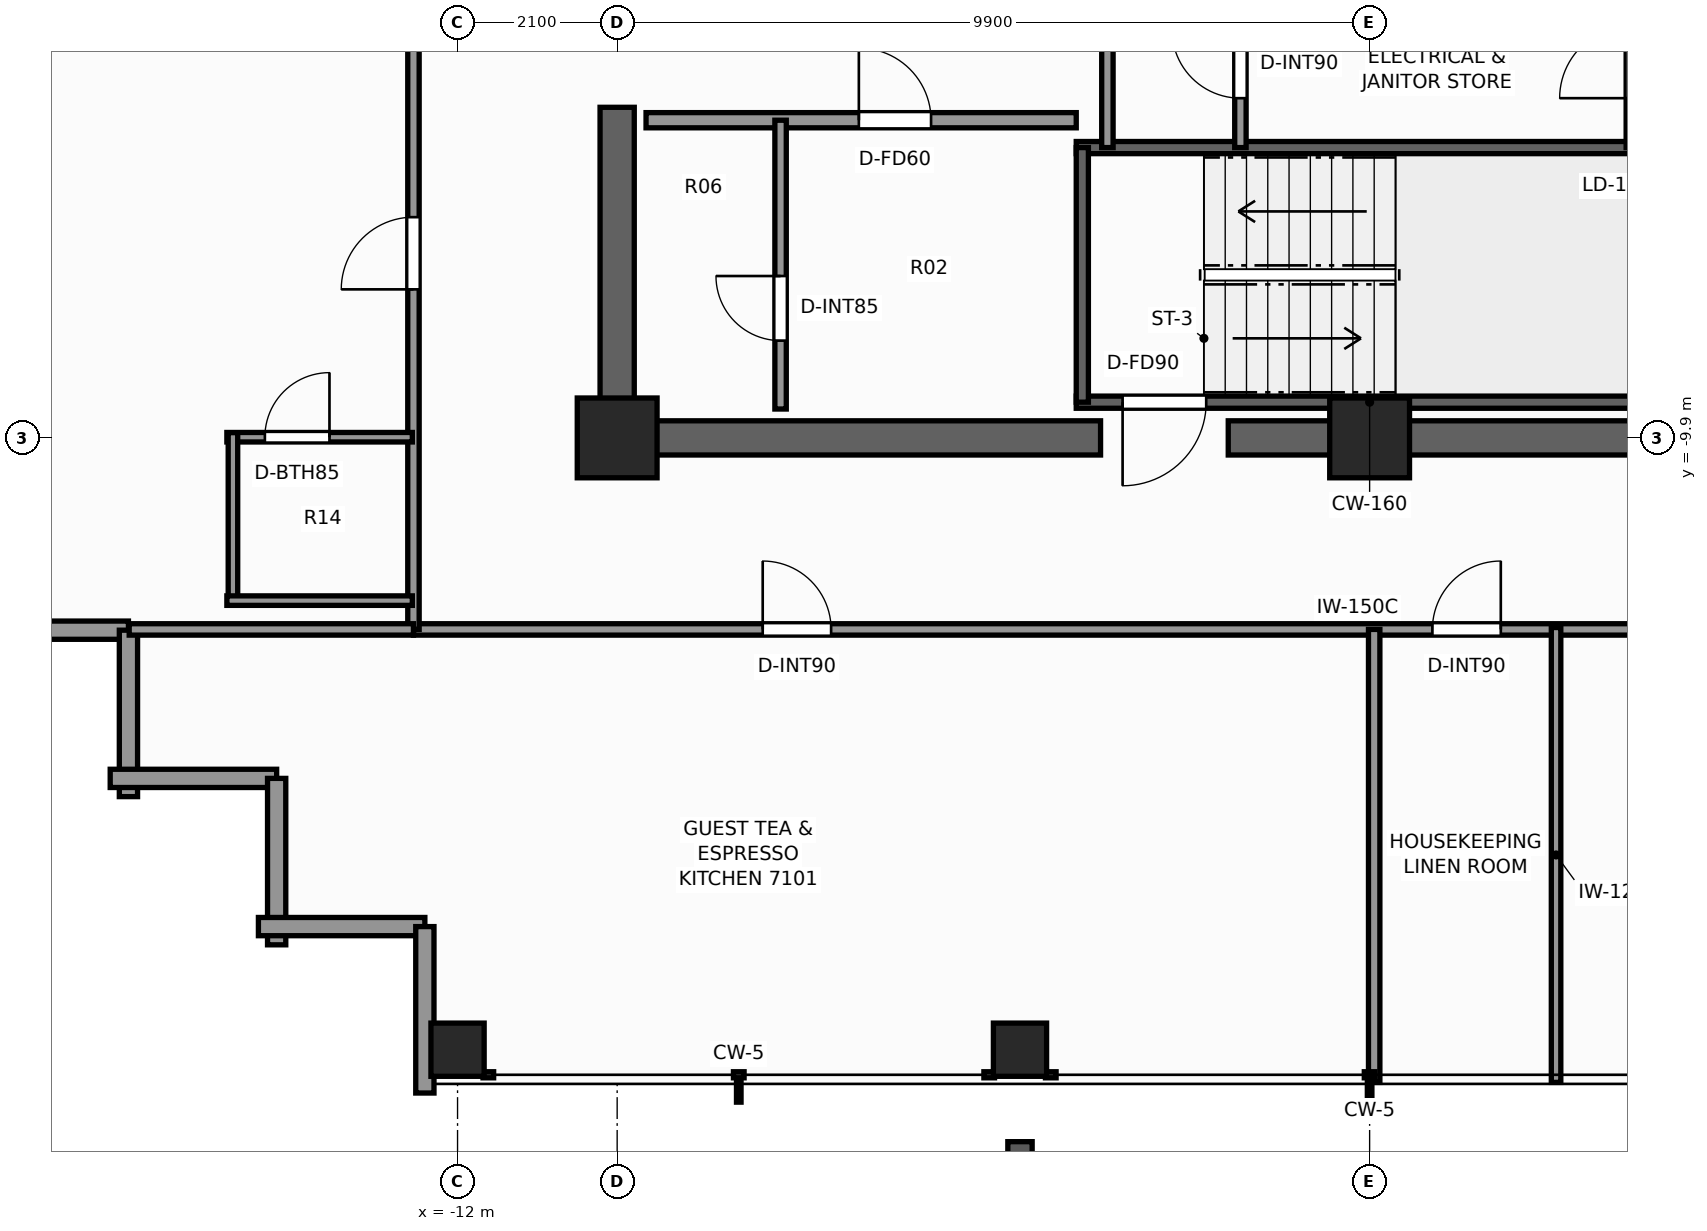
"""IFC4 building model, lengths in metres.
Left out: names, types, materials, properties, quantities, classifications, styles, units other than length and angle.
Written with IfcOpenShell. Run it as: python <this file> out.ifc"""

import sys

from ifc_helpers import new_model, si_unit, direction, frame, frame_2d, origin, origin_2d, place, context, subcontext, project, spatial, rectangle, extrude, element, fill, save


model = new_model("IFC4")
c1 = context("Model", 3, precision=1e-05, world=origin(), true_north=direction((0.0, 1.0)))
c2 = subcontext(c1, "Body", "Model", "MODEL_VIEW")
j1 = project(units=[si_unit("LENGTHUNIT", "METRE"), si_unit("PLANEANGLEUNIT", "RADIAN")], contexts=[c1])
p1 = place(None, origin())
s1 = spatial("IfcSite", under=j1, at=p1, CompositionType="ELEMENT")
p2 = place(p1, origin())
s2 = spatial("IfcBuilding", under=s1, at=p2, CompositionType="ELEMENT")
p3 = place(p2, frame((0.0, 0.0, 244.4)))
s3 = spatial("IfcBuildingStorey", under=s2, at=p3, CompositionType="ELEMENT", Elevation=244.4)
p4 = place(p3, frame((10.125, -9.9, 0.0), z_axis=(0.0, 0.0, 1.0), x_axis=(-1.0, 0.0, 0.0)))
e1 = element("IfcWall", 1, at=p4, inside=s3, PredefinedType="SHEAR", context=c2, shape_type="SweptSolid", body=[
    extrude(rectangle(XDim=11.985, YDim=0.45, at=frame_2d((5.993, 0.0))), origin(), (0.0, 0.0, 1.0), 3.5),
])
p5 = place(p3, frame((-3.54, -9.9, 0.0), z_axis=(0.0, 0.0, 1.0), x_axis=(-1.0, 0.0, 0.0)))
e2 = element("IfcWall", 2, at=p5, inside=s3, PredefinedType="SHEAR", context=c2, shape_type="SweptSolid", body=[
    extrude(rectangle(XDim=6.585, YDim=0.45, at=frame_2d((3.292, 0.0))), origin(), (0.0, 0.0, 1.0), 3.5),
])
p6 = place(p3, frame((-9.9, -9.675, 0.0), z_axis=(0.0, 0.0, 1.0), x_axis=(0.0, 1.0, 0.0)))
e3 = element("IfcWall", 3, at=p6, inside=s3, PredefinedType="SHEAR", context=c2, shape_type="SweptSolid", body=[
    extrude(rectangle(XDim=4.125, YDim=0.45, at=frame_2d((2.062, 0.0))), origin(), (0.0, 0.0, 1.0), 3.5),
])
for number, where, z_axis, x_axis in (
    (4, (-9.9, -9.9, 0.0), (0.0, 0.0, 1.0), (1.0, 0.0, 0.0)),
    (5, (0.0, -9.9, 0.0), (0.0, 0.0, 1.0), (1.0, 0.0, 0.0)),
):
    element("IfcColumn", number, at=place(p3, frame(where, z_axis=z_axis, x_axis=x_axis)), inside=s3, PredefinedType="COLUMN", context=c2, shape_type="SweptSolid", body=[
        extrude(rectangle(XDim=1.05, YDim=1.05, at=origin_2d()), origin(), (0.0, 0.0, 1.0), 3.5),
    ])
for number, where, z_axis, x_axis in (
    (6, (-12.0, -17.95, 0.0), (0.0, 0.0, 1.0), (1.0, 0.0, 0.0)),
    (7, (-4.6, -17.95, 0.0), (0.0, 0.0, 1.0), (1.0, 0.0, 0.0)),
):
    element("IfcColumn", number, at=place(p3, frame(where, z_axis=z_axis, x_axis=x_axis)), inside=s3, PredefinedType="COLUMN", context=c2, shape_type="SweptSolid", body=[
        extrude(rectangle(XDim=0.7, YDim=0.7, at=origin_2d()), origin(), (0.0, 0.0, 1.0), 3.5),
    ])
p7 = place(p3, frame((-16.33, -12.43, 0.0), z_axis=(0.0, 0.0, 1.0), x_axis=(-1.0, 0.0, 0.0)))
e8 = element("IfcWall", 8, at=p7, inside=s3, PredefinedType="STANDARD", context=c2, shape_type="SweptSolid", body=[
    extrude(rectangle(XDim=2.19, YDim=0.24, at=frame_2d((1.095, 0.0))), origin(), (0.0, 0.0, 1.0), 2.633),
])
for number, where, z_axis, x_axis in (
    (9, (-16.33, -14.62, 0.0), (0.0, 0.0, 1.0), (0.0, 1.0, 0.0)),
    (10, (-14.38, -14.38, 0.0), (0.0, 0.0, 1.0), (-1.0, 0.0, 0.0)),
    (11, (-14.38, -16.57, 0.0), (0.0, 0.0, 1.0), (0.0, 1.0, 0.0)),
    (12, (-12.43, -16.33, 0.0), (0.0, 0.0, 1.0), (-1.0, 0.0, 0.0)),
):
    element("IfcWall", number, at=place(p3, frame(where, z_axis=z_axis, x_axis=x_axis)), inside=s3, PredefinedType="STANDARD", context=c2, shape_type="SweptSolid", body=[
        extrude(rectangle(XDim=2.19, YDim=0.24, at=frame_2d((1.095, 0.0))), origin(), (0.0, 0.0, 1.0), 2.633),
    ])
p8 = place(p3, frame((-12.43, -18.52, 0.0), z_axis=(0.0, 0.0, 1.0), x_axis=(0.0, 1.0, 0.0)))
e13 = element("IfcWall", 13, at=p8, inside=s3, PredefinedType="STANDARD", context=c2, shape_type="SweptSolid", body=[
    extrude(rectangle(XDim=2.19, YDim=0.24, at=frame_2d((1.095, 0.0))), origin(), (0.0, 0.0, 1.0), 2.633),
])
p9 = place(p3, frame((3.86, -9.43, 0.0), z_axis=(0.0, 0.0, 1.0), x_axis=(-1.0, 0.0, 0.0)))
e14 = element("IfcWall", 14, at=p9, inside=s3, PredefinedType="SHEAR", context=c2, shape_type="SweptSolid", body=[
    extrude(rectangle(XDim=7.72, YDim=0.16, at=frame_2d((3.86, 0.0))), origin(), (0.0, 0.0, 1.0), 3.5),
])
p10 = place(p9, frame((6.01, 0.0, 0.0)))
e15 = element("IfcOpeningElement", 15, at=p10, cuts=e14, PredefinedType="OPENING", context=c2, shape_type="SweptSolid", body=[
    extrude(rectangle(XDim=1.1, YDim=2.2, at=frame_2d((0.55, 1.1))), frame((0.0, 0.09, 0.0), z_axis=(0.0, -1.0, 0.0), x_axis=(1.0, 0.0, 0.0)), (0.0, 0.0, 1.0), 0.18),
])
p11 = place(p3, frame((-3.86, -6.08, 0.0), z_axis=(0.0, 0.0, 1.0), x_axis=(1.0, 0.0, 0.0)))
e16 = element("IfcWall", 16, at=p11, inside=s3, PredefinedType="SHEAR", context=c2, shape_type="SweptSolid", body=[
    extrude(rectangle(XDim=7.72, YDim=0.16, at=frame_2d((3.86, 0.0))), origin(), (0.0, 0.0, 1.0), 3.5),
])
p12 = place(p3, frame((-3.78, -9.43, 0.0), z_axis=(0.0, 0.0, 1.0), x_axis=(0.0, 1.0, 0.0)))
e17 = element("IfcWall", 17, at=p12, inside=s3, PredefinedType="SHEAR", context=c2, shape_type="SweptSolid", body=[
    extrude(rectangle(XDim=3.35, YDim=0.16, at=frame_2d((1.675, 0.0))), origin(), (0.0, 0.0, 1.0), 3.5),
])
p13 = place(p3, frame((-9.52, -5.72, 0.0), z_axis=(0.0, 0.0, 1.0), x_axis=(1.0, 0.0, 0.0)))
e18 = element("IfcWall", 18, at=p13, inside=s3, PredefinedType="SOLIDWALL", context=c2, shape_type="SweptSolid", body=[
    extrude(rectangle(XDim=5.66, YDim=0.2, at=frame_2d((2.83, 0.0))), origin(), (0.0, 0.0, 1.0), 3.25),
])
p14 = place(p13, frame((2.8, 0.0, 0.0)))
e19 = element("IfcOpeningElement", 19, at=p14, cuts=e18, PredefinedType="OPENING", context=c2, shape_type="SweptSolid", body=[
    extrude(rectangle(XDim=0.95, YDim=2.06, at=frame_2d((0.475, 1.03))), frame((0.0, 0.11, 0.0), z_axis=(0.0, -1.0, 0.0), x_axis=(1.0, 0.0, 0.0)), (0.0, 0.0, 1.0), 0.22),
])
p15 = place(p3, frame((-7.75, -9.52, 0.0), z_axis=(0.0, 0.0, 1.0), x_axis=(0.0, 1.0, 0.0)))
e20 = element("IfcWall", 20, at=p15, inside=s3, PredefinedType="PARTITIONING", context=c2, shape_type="SweptSolid", body=[
    extrude(rectangle(XDim=3.8, YDim=0.15, at=frame_2d((1.9, 0.0))), origin(), (0.0, 0.0, 1.0), 3.25),
])
p16 = place(p15, frame((0.9, 0.0, 0.0)))
e21 = element("IfcOpeningElement", 21, at=p16, cuts=e20, PredefinedType="OPENING", context=c2, shape_type="SweptSolid", body=[
    extrude(rectangle(XDim=0.85, YDim=2.03, at=frame_2d((0.425, 1.015))), frame((0.0, 0.085, 0.0), z_axis=(0.0, -1.0, 0.0), x_axis=(1.0, 0.0, 0.0)), (0.0, 0.0, 1.0), 0.17),
])
p17 = place(p3, frame((3.45, -6.08, 0.0), z_axis=(0.0, 0.0, 1.0), x_axis=(0.0, 1.0, 0.0)))
e22 = element("IfcWall", 22, at=p17, inside=s3, PredefinedType="PARTITIONING", context=c2, shape_type="SweptSolid", body=[
    extrude(rectangle(XDim=2.36, YDim=0.15, at=frame_2d((1.18, 0.0))), origin(), (0.0, 0.0, 1.0), 3.25),
])
p18 = place(p17, frame((0.65, 0.0, 0.0)))
e23 = element("IfcOpeningElement", 23, at=p18, cuts=e22, PredefinedType="OPENING", context=c2, shape_type="SweptSolid", body=[
    extrude(rectangle(XDim=0.95, YDim=2.06, at=frame_2d((0.475, 1.03))), frame((0.0, 0.085, 0.0), z_axis=(0.0, -1.0, 0.0), x_axis=(1.0, 0.0, 0.0)), (0.0, 0.0, 1.0), 0.17),
])
p19 = place(p3, frame((-3.45, -6.08, 0.0), z_axis=(0.0, 0.0, 1.0), x_axis=(0.0, 1.0, 0.0)))
e24 = element("IfcWall", 24, at=p19, inside=s3, PredefinedType="PARTITIONING", context=c2, shape_type="SweptSolid", body=[
    extrude(rectangle(XDim=2.36, YDim=0.15, at=frame_2d((1.18, 0.0))), origin(), (0.0, 0.0, 1.0), 3.25),
])
p20 = place(p3, frame((-1.7, -6.08, 0.0), z_axis=(0.0, 0.0, 1.0), x_axis=(0.0, 1.0, 0.0)))
e25 = element("IfcWall", 25, at=p20, inside=s3, PredefinedType="PARTITIONING", context=c2, shape_type="SweptSolid", body=[
    extrude(rectangle(XDim=2.36, YDim=0.15, at=frame_2d((1.18, 0.0))), origin(), (0.0, 0.0, 1.0), 3.25),
])
p21 = place(p20, frame((0.65, 0.0, 0.0)))
e26 = element("IfcOpeningElement", 26, at=p21, cuts=e25, PredefinedType="OPENING", context=c2, shape_type="SweptSolid", body=[
    extrude(rectangle(XDim=0.9, YDim=2.06, at=frame_2d((0.45, 1.03))), frame((0.0, 0.085, 0.0), z_axis=(0.0, -1.0, 0.0), x_axis=(1.0, 0.0, 0.0)), (0.0, 0.0, 1.0), 0.17),
])
p22 = place(p3, frame((-12.58, -12.42, 0.0), z_axis=(0.0, 0.0, 1.0), x_axis=(1.0, 0.0, 0.0)))
e27 = element("IfcWall", 27, at=p22, inside=s3, PredefinedType="PARTITIONING", context=c2, shape_type="SweptSolid", body=[
    extrude(rectangle(XDim=24.84, YDim=0.15, at=frame_2d((12.42, 0.0))), origin(), (0.0, 0.0, 1.0), 2.539),
])
p23 = place(p22, frame((4.595, 0.0, 0.0)))
e28 = element("IfcOpeningElement", 28, at=p23, cuts=e27, PredefinedType="OPENING", context=c2, shape_type="SweptSolid", body=[
    extrude(rectangle(XDim=0.9, YDim=2.06, at=frame_2d((0.45, 1.03))), frame((0.0, 0.085, 0.0), z_axis=(0.0, -1.0, 0.0), x_axis=(1.0, 0.0, 0.0)), (0.0, 0.0, 1.0), 0.17),
])
p24 = place(p22, frame((13.406, 0.0, 0.0)))
e29 = element("IfcOpeningElement", 29, at=p24, cuts=e27, PredefinedType="OPENING", context=c2, shape_type="SweptSolid", body=[
    extrude(rectangle(XDim=0.9, YDim=2.06, at=frame_2d((0.45, 1.03))), frame((0.0, 0.085, 0.0), z_axis=(0.0, -1.0, 0.0), x_axis=(1.0, 0.0, 0.0)), (0.0, 0.0, 1.0), 0.17),
])
p25 = place(p22, frame((18.028, 0.0, 0.0)))
e30 = element("IfcOpeningElement", 30, at=p25, cuts=e27, PredefinedType="OPENING", context=c2, shape_type="SweptSolid", body=[
    extrude(rectangle(XDim=0.95, YDim=2.06, at=frame_2d((0.475, 1.03))), frame((0.0, 0.085, 0.0), z_axis=(0.0, -1.0, 0.0), x_axis=(1.0, 0.0, 0.0)), (0.0, 0.0, 1.0), 0.17),
])
p26 = place(p22, frame((20.478, 0.0, 0.0)))
e31 = element("IfcOpeningElement", 31, at=p26, cuts=e27, PredefinedType="OPENING", context=c2, shape_type="SweptSolid", body=[
    extrude(rectangle(XDim=0.9, YDim=2.06, at=frame_2d((0.45, 1.03))), frame((0.0, 0.085, 0.0), z_axis=(0.0, -1.0, 0.0), x_axis=(1.0, 0.0, 0.0)), (0.0, 0.0, 1.0), 0.17),
])
p27 = place(p3, frame((-12.58, -12.42, 0.0), z_axis=(0.0, 0.0, 1.0), x_axis=(0.0, 1.0, 0.0)))
e32 = element("IfcWall", 32, at=p27, inside=s3, PredefinedType="PARTITIONING", context=c2, shape_type="SweptSolid", body=[
    extrude(rectangle(XDim=24.84, YDim=0.15, at=frame_2d((12.42, 0.0))), origin(), (0.0, 0.0, 1.0), 2.539),
])
p28 = place(p27, frame((4.475, 0.0, 0.0)))
e33 = element("IfcOpeningElement", 33, at=p28, cuts=e32, PredefinedType="OPENING", context=c2, shape_type="SweptSolid", body=[
    extrude(rectangle(XDim=0.95, YDim=2.06, at=frame_2d((0.475, 1.03))), frame((0.0, 0.085, 0.0), z_axis=(0.0, -1.0, 0.0), x_axis=(1.0, 0.0, 0.0)), (0.0, 0.0, 1.0), 0.17),
])
p29 = place(p27, frame((19.48, 0.0, 0.0)))
e34 = element("IfcOpeningElement", 34, at=p29, cuts=e32, PredefinedType="OPENING", context=c2, shape_type="SweptSolid", body=[
    extrude(rectangle(XDim=0.95, YDim=2.06, at=frame_2d((0.475, 1.03))), frame((0.0, 0.085, 0.0), z_axis=(0.0, -1.0, 0.0), x_axis=(1.0, 0.0, 0.0)), (0.0, 0.0, 1.0), 0.17),
])
p30 = place(p3, frame((-16.32, -12.42, 0.0), z_axis=(0.0, 0.0, 1.0), x_axis=(1.0, 0.0, 0.0)))
e35 = element("IfcWall", 35, at=p30, inside=s3, PredefinedType="PARTITIONING", context=c2, shape_type="SweptSolid", body=[
    extrude(rectangle(XDim=3.74, YDim=0.15, at=frame_2d((1.87, 0.0))), origin(), (0.0, 0.0, 1.0), 3.25),
])
p31 = place(p3, frame((0.06, -18.38, 0.0), z_axis=(0.0, 0.0, 1.0), x_axis=(0.0, 1.0, 0.0)))
e36 = element("IfcWall", 36, at=p31, inside=s3, PredefinedType="PARTITIONING", context=c2, shape_type="SweptSolid", body=[
    extrude(rectangle(XDim=5.96, YDim=0.15, at=frame_2d((2.98, 0.0))), origin(), (0.0, 0.0, 1.0), 2.623),
])
p32 = place(p3, frame((2.453, -18.38, 0.0), z_axis=(0.0, 0.0, 1.0), x_axis=(0.0, 1.0, 0.0)))
e37 = element("IfcWall", 37, at=p32, inside=s3, PredefinedType="PARTITIONING", context=c2, shape_type="SweptSolid", body=[
    extrude(rectangle(XDim=5.985, YDim=0.125, at=frame_2d((2.992, 0.0))), origin(), (0.0, 0.0, 1.0), 2.623),
])
p33 = place(p3, frame((-15.035, -9.891, 0.0), z_axis=(0.0, 0.0, 1.0), x_axis=(1.0, 0.0, 0.0)))
e38 = element("IfcWall", 38, at=p33, inside=s3, PredefinedType="PARTITIONING", context=c2, shape_type="SweptSolid", body=[
    extrude(rectangle(XDim=2.44, YDim=0.125, at=frame_2d((1.22, 0.0))), origin(), (0.0, 0.0, 1.0), 3.25),
])
p34 = place(p33, frame((0.5, 0.0, 0.0)))
e39 = element("IfcOpeningElement", 39, at=p34, cuts=e38, PredefinedType="OPENING", context=c2, shape_type="SweptSolid", body=[
    extrude(rectangle(XDim=0.85, YDim=2.03, at=frame_2d((0.425, 1.015))), frame((0.0, 0.073, 0.0), z_axis=(0.0, -1.0, 0.0), x_axis=(1.0, 0.0, 0.0)), (0.0, 0.0, 1.0), 0.145),
])
p35 = place(p3, frame((-14.955, -12.101, 0.0), z_axis=(0.0, 0.0, 1.0), x_axis=(0.0, 1.0, 0.0)))
e40 = element("IfcWall", 40, at=p35, inside=s3, PredefinedType="PARTITIONING", context=c2, shape_type="SweptSolid", body=[
    extrude(rectangle(XDim=2.27, YDim=0.125, at=frame_2d((1.135, 0.0))), origin(), (0.0, 0.0, 1.0), 2.539),
])
p36 = place(p3, frame((-15.035, -12.041, 0.0), z_axis=(0.0, 0.0, 1.0), x_axis=(1.0, 0.0, 0.0)))
e41 = element("IfcWall", 41, at=p36, inside=s3, PredefinedType="PARTITIONING", context=c2, shape_type="SweptSolid", body=[
    extrude(rectangle(XDim=2.44, YDim=0.125, at=frame_2d((1.22, 0.0))), origin(), (0.0, 0.0, 1.0), 3.25),
])
p37 = place(p10, origin())
e42 = element("IfcDoor", 42, at=p37, inside=s3, OperationType="SINGLE_SWING_RIGHT", PredefinedType="DOOR", context=c2, shape_type="SweptSolid", body=[
    extrude(rectangle(XDim=1.1, YDim=2.2, at=frame_2d((0.55, 1.1))), frame((0.0, 0.025, 0.0), z_axis=(0.0, -1.0, 0.0), x_axis=(1.0, 0.0, 0.0)), (0.0, 0.0, 1.0), 0.05),
])
fill(e15, e42)
p38 = place(p14, origin())
e43 = element("IfcDoor", 43, at=p38, inside=s3, OperationType="SINGLE_SWING_LEFT", PredefinedType="DOOR", context=c2, shape_type="SweptSolid", body=[
    extrude(rectangle(XDim=0.95, YDim=2.06, at=frame_2d((0.475, 1.03))), frame((0.0, 0.025, 0.0), z_axis=(0.0, -1.0, 0.0), x_axis=(1.0, 0.0, 0.0)), (0.0, 0.0, 1.0), 0.05),
])
fill(e19, e43)
p39 = place(p16, origin())
e44 = element("IfcDoor", 44, at=p39, inside=s3, OperationType="SINGLE_SWING_RIGHT", PredefinedType="DOOR", context=c2, shape_type="SweptSolid", body=[
    extrude(rectangle(XDim=0.85, YDim=2.03, at=frame_2d((0.425, 1.015))), frame((0.0, 0.025, 0.0), z_axis=(0.0, -1.0, 0.0), x_axis=(1.0, 0.0, 0.0)), (0.0, 0.0, 1.0), 0.05),
])
fill(e21, e44)
p40 = place(p21, origin())
e45 = element("IfcDoor", 45, at=p40, inside=s3, OperationType="SINGLE_SWING_RIGHT", PredefinedType="DOOR", context=c2, shape_type="SweptSolid", body=[
    extrude(rectangle(XDim=0.9, YDim=2.06, at=frame_2d((0.45, 1.03))), frame((0.0, 0.025, 0.0), z_axis=(0.0, -1.0, 0.0), x_axis=(1.0, 0.0, 0.0)), (0.0, 0.0, 1.0), 0.05),
])
fill(e26, e45)
p41 = place(p23, origin())
e46 = element("IfcDoor", 46, at=p41, inside=s3, OperationType="SINGLE_SWING_LEFT", PredefinedType="DOOR", context=c2, shape_type="SweptSolid", body=[
    extrude(rectangle(XDim=0.9, YDim=2.06, at=frame_2d((0.45, 1.03))), frame((0.0, 0.025, 0.0), z_axis=(0.0, -1.0, 0.0), x_axis=(1.0, 0.0, 0.0)), (0.0, 0.0, 1.0), 0.05),
])
fill(e28, e46)
p42 = place(p24, origin())
e47 = element("IfcDoor", 47, at=p42, inside=s3, OperationType="SINGLE_SWING_RIGHT", PredefinedType="DOOR", context=c2, shape_type="SweptSolid", body=[
    extrude(rectangle(XDim=0.9, YDim=2.06, at=frame_2d((0.45, 1.03))), frame((0.0, 0.025, 0.0), z_axis=(0.0, -1.0, 0.0), x_axis=(1.0, 0.0, 0.0)), (0.0, 0.0, 1.0), 0.05),
])
fill(e29, e47)
p43 = place(p34, origin())
e48 = element("IfcDoor", 48, at=p43, inside=s3, OperationType="SINGLE_SWING_RIGHT", PredefinedType="DOOR", context=c2, shape_type="SweptSolid", body=[
    extrude(rectangle(XDim=0.85, YDim=2.03, at=frame_2d((0.425, 1.015))), frame((0.0, 0.025, 0.0), z_axis=(0.0, -1.0, 0.0), x_axis=(1.0, 0.0, 0.0)), (0.0, 0.0, 1.0), 0.05),
])
fill(e39, e48)
p44 = place(p28, origin())
e49 = element("IfcDoor", 49, at=p44, inside=s3, OperationType="SINGLE_SWING_LEFT", PredefinedType="DOOR", context=c2, shape_type="SweptSolid", body=[
    extrude(rectangle(XDim=0.95, YDim=2.06, at=frame_2d((0.475, 1.03))), frame((0.0, 0.025, 0.0), z_axis=(0.0, -1.0, 0.0), x_axis=(1.0, 0.0, 0.0)), (0.0, 0.0, 1.0), 0.05),
])
fill(e33, e49)
save(model, sys.argv[1])
